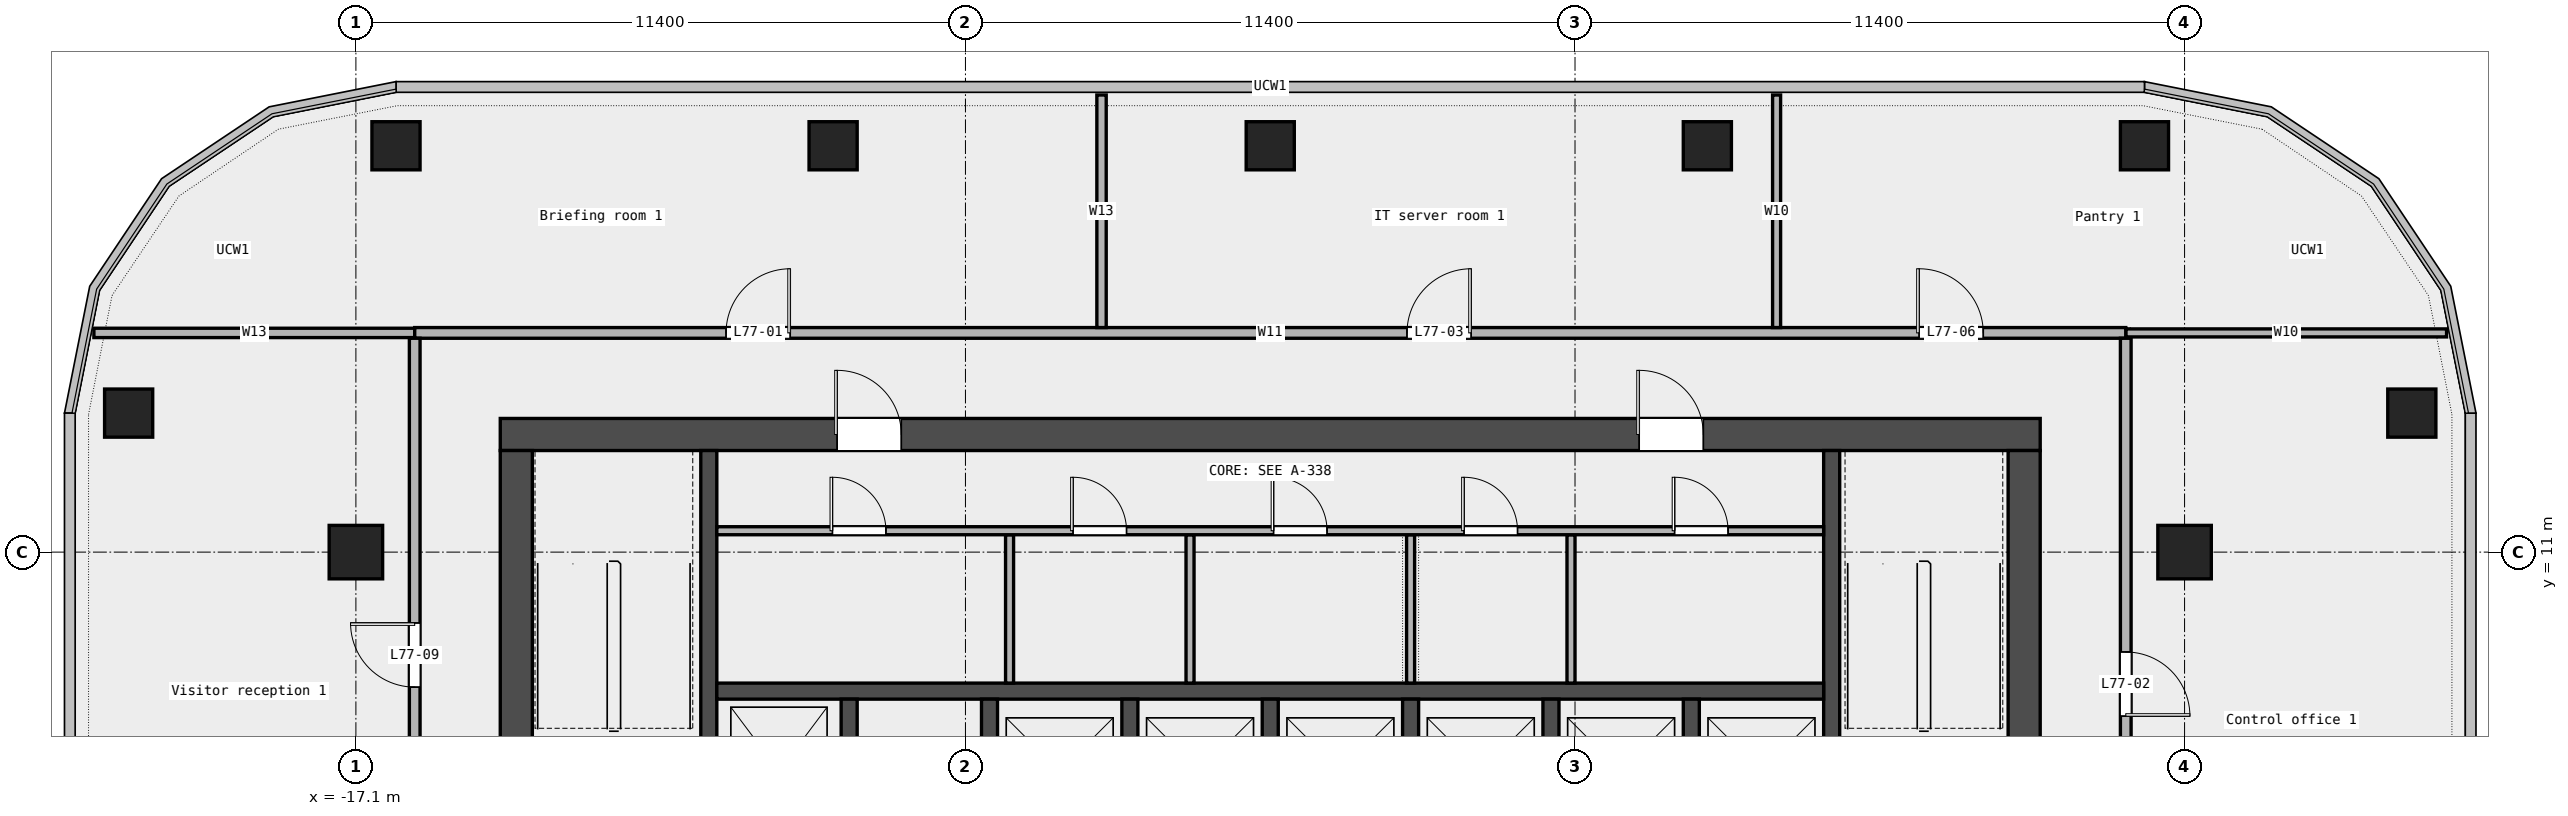
"""IFC4 building model, lengths in metres.
Left out: names, types, materials, properties, quantities, classifications, styles, units other than length and angle.
Written with IfcOpenShell. Run it as: python <this file> out.ifc"""

import sys

from ifc_helpers import new_model, si_unit, direction, frame, frame_2d, origin, origin_2d, place, context, subcontext, project, spatial, rectangle, extrude, element, fill, save


model = new_model("IFC4")
c1 = context("Model", 3, precision=1e-05, world=origin(), true_north=direction((0.0, 1.0)))
c2 = subcontext(c1, "Body", "Model", "MODEL_VIEW")
j1 = project(units=[si_unit("LENGTHUNIT", "METRE"), si_unit("PLANEANGLEUNIT", "RADIAN")], contexts=[c1])
p1 = place(None, origin())
s1 = spatial("IfcSite", under=j1, at=p1, CompositionType="ELEMENT")
p2 = place(p1, origin())
s2 = spatial("IfcBuilding", under=s1, at=p2, CompositionType="ELEMENT")
p3 = place(p2, frame((0.0, 0.0, 353.4)))
s3 = spatial("IfcBuildingStorey", under=s2, at=p3, CompositionType="ELEMENT", Elevation=353.4)
for number, where, z_axis, x_axis in (
    (1, (21.35, 13.6, 0.0), (0.0, 0.0, 1.0), (1.0, 0.0, 0.0)),
    (2, (16.35, 18.6, 0.0), (0.0, 0.0, 1.0), (1.0, 0.0, 0.0)),
    (3, (8.175, 18.6, 0.0), (0.0, 0.0, 1.0), (1.0, 0.0, 0.0)),
    (4, (0.0, 18.6, 0.0), (0.0, 0.0, 1.0), (1.0, 0.0, 0.0)),
    (5, (-8.175, 18.6, 0.0), (0.0, 0.0, 1.0), (1.0, 0.0, 0.0)),
    (6, (-16.35, 18.6, 0.0), (0.0, 0.0, 1.0), (1.0, 0.0, 0.0)),
    (7, (-21.35, 13.6, 0.0), (0.0, 0.0, 1.0), (1.0, 0.0, 0.0)),
):
    element("IfcColumn", number, at=place(p3, frame(where, z_axis=z_axis, x_axis=x_axis)), inside=s3, PredefinedType="COLUMN", context=c2, shape_type="SweptSolid", body=[
        extrude(rectangle(XDim=0.9, YDim=0.9, at=origin_2d()), origin(), (0.0, 0.0, 1.0), 3.6),
    ])
for number, where, z_axis, x_axis in (
    (8, (-17.1, 11.0, 0.0), (0.0, 0.0, 1.0), (1.0, 0.0, 0.0)),
    (9, (17.1, 11.0, 0.0), (0.0, 0.0, 1.0), (1.0, 0.0, 0.0)),
):
    element("IfcColumn", number, at=place(p3, frame(where, z_axis=z_axis, x_axis=x_axis)), inside=s3, PredefinedType="COLUMN", context=c2, shape_type="SweptSolid", body=[
        extrude(rectangle(XDim=1.0, YDim=1.0, at=origin_2d()), origin(), (0.0, 0.0, 1.0), 3.6),
    ])
p4 = place(p3, frame((16.0, 15.1, 0.0), z_axis=(0.0, 0.0, 1.0), x_axis=(1.0, 0.0, 0.0)))
e10 = element("IfcWall", 10, at=p4, inside=s3, PredefinedType="PARTITIONING", context=c2, shape_type="SweptSolid", body=[
    extrude(rectangle(XDim=6.0, YDim=0.15, at=frame_2d((3.0, 0.0))), origin(), (0.0, 0.0, 1.0), 3.6),
])
p5 = place(p3, frame((-22.0, 15.1, 0.0), z_axis=(0.0, 0.0, 1.0), x_axis=(1.0, 0.0, 0.0)))
e11 = element("IfcWall", 11, at=p5, inside=s3, PredefinedType="PARTITIONING", context=c2, shape_type="SweptSolid", body=[
    extrude(rectangle(XDim=6.0, YDim=0.175, at=frame_2d((3.0, 0.0))), origin(), (0.0, 0.0, 1.0), 3.6),
])
p6 = place(p3, frame((-16.0, 15.1, 0.0), z_axis=(0.0, 0.0, 1.0), x_axis=(1.0, 0.0, 0.0)))
e12 = element("IfcWall", 12, at=p6, inside=s3, PredefinedType="PARTITIONING", context=c2, shape_type="SweptSolid", body=[
    extrude(rectangle(XDim=32.0, YDim=0.2, at=frame_2d((16.0, 0.0))), origin(), (0.0, 0.0, 1.0), 3.6),
])
p7 = place(p6, frame((5.823, 0.0, 0.0)))
e13 = element("IfcOpeningElement", 13, at=p7, cuts=e12, PredefinedType="OPENING", context=c2, shape_type="SweptSolid", body=[
    extrude(rectangle(XDim=1.2, YDim=2.1, at=frame_2d((0.6, 1.05))), frame((0.0, 0.112, 0.0), z_axis=(0.0, -1.0, 0.0), x_axis=(1.0, 0.0, 0.0)), (0.0, 0.0, 1.0), 0.224),
])
p8 = place(p6, frame((18.558, 0.0, 0.0)))
e14 = element("IfcOpeningElement", 14, at=p8, cuts=e12, PredefinedType="OPENING", context=c2, shape_type="SweptSolid", body=[
    extrude(rectangle(XDim=1.2, YDim=2.1, at=frame_2d((0.6, 1.05))), frame((0.0, 0.112, 0.0), z_axis=(0.0, -1.0, 0.0), x_axis=(1.0, 0.0, 0.0)), (0.0, 0.0, 1.0), 0.224),
])
p9 = place(p6, frame((28.135, 0.0, 0.0)))
e15 = element("IfcOpeningElement", 15, at=p9, cuts=e12, PredefinedType="OPENING", context=c2, shape_type="SweptSolid", body=[
    extrude(rectangle(XDim=1.2, YDim=2.1, at=frame_2d((0.6, 1.05))), frame((0.0, 0.112, 0.0), z_axis=(0.0, -1.0, 0.0), x_axis=(1.0, 0.0, 0.0)), (0.0, 0.0, 1.0), 0.224),
])
p10 = place(p3, frame((-16.0, -8.7, 0.0), z_axis=(0.0, 0.0, 1.0), x_axis=(0.0, 1.0, 0.0)))
e16 = element("IfcWall", 16, at=p10, inside=s3, PredefinedType="PARTITIONING", context=c2, shape_type="SweptSolid", body=[
    extrude(rectangle(XDim=23.7, YDim=0.2, at=frame_2d((11.85, 0.0))), origin(), (0.0, 0.0, 1.0), 3.6),
])
p11 = place(p10, frame((5.325, 0.0, 0.0)))
e17 = element("IfcOpeningElement", 17, at=p11, cuts=e16, PredefinedType="OPENING", context=c2, shape_type="SweptSolid", body=[
    extrude(rectangle(XDim=1.2, YDim=2.1, at=frame_2d((0.6, 1.05))), frame((0.0, 0.112, 0.0), z_axis=(0.0, -1.0, 0.0), x_axis=(1.0, 0.0, 0.0)), (0.0, 0.0, 1.0), 0.224),
])
p12 = place(p10, frame((17.175, 0.0, 0.0)))
e18 = element("IfcOpeningElement", 18, at=p12, cuts=e16, PredefinedType="OPENING", context=c2, shape_type="SweptSolid", body=[
    extrude(rectangle(XDim=1.2, YDim=2.1, at=frame_2d((0.6, 1.05))), frame((0.0, 0.112, 0.0), z_axis=(0.0, -1.0, 0.0), x_axis=(1.0, 0.0, 0.0)), (0.0, 0.0, 1.0), 0.224),
])
p13 = place(p3, frame((-3.155, 15.2, 0.0), z_axis=(0.0, 0.0, 1.0), x_axis=(0.0, 1.0, 0.0)))
e19 = element("IfcWall", 19, at=p13, inside=s3, PredefinedType="PARTITIONING", context=c2, shape_type="SweptSolid", body=[
    extrude(rectangle(XDim=4.35, YDim=0.175, at=frame_2d((2.175, 0.0))), origin(), (0.0, 0.0, 1.0), 3.6),
])
p14 = place(p3, frame((9.47, 15.2, 0.0), z_axis=(0.0, 0.0, 1.0), x_axis=(0.0, 1.0, 0.0)))
e20 = element("IfcWall", 20, at=p14, inside=s3, PredefinedType="PARTITIONING", context=c2, shape_type="SweptSolid", body=[
    extrude(rectangle(XDim=4.35, YDim=0.15, at=frame_2d((2.175, 0.0))), origin(), (0.0, 0.0, 1.0), 3.6),
])
p15 = place(p3, frame((16.0, -8.7, 0.0), z_axis=(0.0, 0.0, 1.0), x_axis=(0.0, 1.0, 0.0)))
e21 = element("IfcWall", 21, at=p15, inside=s3, PredefinedType="PARTITIONING", context=c2, shape_type="SweptSolid", body=[
    extrude(rectangle(XDim=23.7, YDim=0.2, at=frame_2d((11.85, 0.0))), origin(), (0.0, 0.0, 1.0), 3.6),
])
p16 = place(p15, frame((16.633, 0.0, 0.0)))
e22 = element("IfcOpeningElement", 22, at=p16, cuts=e21, PredefinedType="OPENING", context=c2, shape_type="SweptSolid", body=[
    extrude(rectangle(XDim=1.2, YDim=2.1, at=frame_2d((0.6, 1.05))), frame((0.0, 0.112, 0.0), z_axis=(0.0, -1.0, 0.0), x_axis=(1.0, 0.0, 0.0)), (0.0, 0.0, 1.0), 0.224),
])
p17 = place(p15, frame((4.883, 0.0, 0.0)))
e23 = element("IfcOpeningElement", 23, at=p17, cuts=e21, PredefinedType="OPENING", context=c2, shape_type="SweptSolid", body=[
    extrude(rectangle(XDim=1.0, YDim=2.1, at=frame_2d((0.5, 1.05))), frame((0.0, 0.112, 0.0), z_axis=(0.0, -1.0, 0.0), x_axis=(1.0, 0.0, 0.0)), (0.0, 0.0, 1.0), 0.224),
])
p18 = place(p3, frame((-14.4, 13.2, 0.0), z_axis=(0.0, 0.0, 1.0), x_axis=(1.0, 0.0, 0.0)))
e24 = element("IfcWall", 24, at=p18, inside=s3, PredefinedType="SHEAR", context=c2, shape_type="SweptSolid", body=[
    extrude(rectangle(XDim=28.8, YDim=0.6, at=frame_2d((14.4, 0.0))), origin(), (0.0, 0.0, 1.0), 3.7),
])
p19 = place(p18, frame((6.3, 0.0, 0.0)))
e25 = element("IfcOpeningElement", 25, at=p19, cuts=e24, PredefinedType="OPENING", context=c2, shape_type="SweptSolid", body=[
    extrude(rectangle(XDim=1.2, YDim=2.1, at=frame_2d((0.6, 1.05))), frame((0.0, 0.312, 0.0), z_axis=(0.0, -1.0, 0.0), x_axis=(1.0, 0.0, 0.0)), (0.0, 0.0, 1.0), 0.624),
])
p20 = place(p18, frame((21.3, 0.0, 0.0)))
e26 = element("IfcOpeningElement", 26, at=p20, cuts=e24, PredefinedType="OPENING", context=c2, shape_type="SweptSolid", body=[
    extrude(rectangle(XDim=1.2, YDim=2.1, at=frame_2d((0.6, 1.05))), frame((0.0, 0.312, 0.0), z_axis=(0.0, -1.0, 0.0), x_axis=(1.0, 0.0, 0.0)), (0.0, 0.0, 1.0), 0.624),
])
p21 = place(p3, frame((-14.1, -6.6, 0.0), z_axis=(0.0, 0.0, 1.0), x_axis=(0.0, 1.0, 0.0)))
e27 = element("IfcWall", 27, at=p21, inside=s3, PredefinedType="SHEAR", context=c2, shape_type="SweptSolid", body=[
    extrude(rectangle(XDim=19.5, YDim=0.6, at=frame_2d((9.75, 0.0))), origin(), (0.0, 0.0, 1.0), 3.7),
])
p22 = place(p21, frame((9.3, 0.0, 0.0)))
e28 = element("IfcOpeningElement", 28, at=p22, cuts=e27, PredefinedType="OPENING", context=c2, shape_type="SweptSolid", body=[
    extrude(rectangle(XDim=1.8, YDim=2.1, at=frame_2d((0.9, 1.05))), frame((0.0, 0.312, 0.0), z_axis=(0.0, -1.0, 0.0), x_axis=(1.0, 0.0, 0.0)), (0.0, 0.0, 1.0), 0.624),
])
p23 = place(p3, frame((14.1, -6.6, 0.0), z_axis=(0.0, 0.0, 1.0), x_axis=(0.0, 1.0, 0.0)))
e29 = element("IfcWall", 29, at=p23, inside=s3, PredefinedType="SHEAR", context=c2, shape_type="SweptSolid", body=[
    extrude(rectangle(XDim=19.5, YDim=0.6, at=frame_2d((9.75, 0.0))), origin(), (0.0, 0.0, 1.0), 3.7),
])
p24 = place(p23, frame((9.3, 0.0, 0.0)))
e30 = element("IfcOpeningElement", 30, at=p24, cuts=e29, PredefinedType="OPENING", context=c2, shape_type="SweptSolid", body=[
    extrude(rectangle(XDim=1.8, YDim=2.1, at=frame_2d((0.9, 1.05))), frame((0.0, 0.312, 0.0), z_axis=(0.0, -1.0, 0.0), x_axis=(1.0, 0.0, 0.0)), (0.0, 0.0, 1.0), 0.624),
])
for number, where, z_axis, x_axis in (
    (31, (-10.5, 5.25, 0.0), (0.0, 0.0, 1.0), (0.0, 1.0, 0.0)),
    (32, (10.5, 5.25, 0.0), (0.0, 0.0, 1.0), (0.0, 1.0, 0.0)),
):
    element("IfcWall", number, at=place(p3, frame(where, z_axis=z_axis, x_axis=x_axis)), inside=s3, PredefinedType="SHEAR", context=c2, shape_type="SweptSolid", body=[
        extrude(rectangle(XDim=7.65, YDim=0.3, at=frame_2d((3.825, 0.0))), origin(), (0.0, 0.0, 1.0), 3.7),
    ])
p25 = place(p3, frame((-10.35, 8.4, 0.0), z_axis=(0.0, 0.0, 1.0), x_axis=(1.0, 0.0, 0.0)))
e33 = element("IfcWall", 33, at=p25, inside=s3, PredefinedType="SOLIDWALL", context=c2, shape_type="SweptSolid", body=[
    extrude(rectangle(XDim=20.7, YDim=0.3, at=frame_2d((10.35, 0.0))), origin(), (0.0, 0.0, 1.0), 3.7),
])
for number, where, z_axis, x_axis in (
    (34, (-7.875, 5.55, 0.0), (0.0, 0.0, 1.0), (0.0, 1.0, 0.0)),
    (35, (-5.25, 5.55, 0.0), (0.0, 0.0, 1.0), (0.0, 1.0, 0.0)),
    (36, (-2.625, 5.55, 0.0), (0.0, 0.0, 1.0), (0.0, 1.0, 0.0)),
    (37, (0.0, 5.55, 0.0), (0.0, 0.0, 1.0), (0.0, 1.0, 0.0)),
    (38, (2.625, 5.55, 0.0), (0.0, 0.0, 1.0), (0.0, 1.0, 0.0)),
    (39, (5.25, 5.55, 0.0), (0.0, 0.0, 1.0), (0.0, 1.0, 0.0)),
    (40, (7.875, 5.55, 0.0), (0.0, 0.0, 1.0), (0.0, 1.0, 0.0)),
):
    element("IfcWall", number, at=place(p3, frame(where, z_axis=z_axis, x_axis=x_axis)), inside=s3, PredefinedType="SOLIDWALL", context=c2, shape_type="SweptSolid", body=[
        extrude(rectangle(XDim=2.7, YDim=0.3, at=frame_2d((1.35, 0.0))), origin(), (0.0, 0.0, 1.0), 3.7),
    ])
for number, where, z_axis, x_axis in (
    (41, (-4.875, 8.55, 0.0), (0.0, 0.0, 1.0), (0.0, 1.0, 0.0)),
    (42, (-1.5, 8.55, 0.0), (0.0, 0.0, 1.0), (0.0, 1.0, 0.0)),
    (43, (2.625, 8.55, 0.0), (0.0, 0.0, 1.0), (0.0, 1.0, 0.0)),
    (44, (5.625, 8.55, 0.0), (0.0, 0.0, 1.0), (0.0, 1.0, 0.0)),
):
    element("IfcWall", number, at=place(p3, frame(where, z_axis=z_axis, x_axis=x_axis)), inside=s3, PredefinedType="PARTITIONING", context=c2, shape_type="SweptSolid", body=[
        extrude(rectangle(XDim=2.775, YDim=0.15, at=frame_2d((1.387, 0.0))), origin(), (0.0, 0.0, 1.0), 3.7),
    ])
p26 = place(p3, frame((-10.35, 11.4, 0.0), z_axis=(0.0, 0.0, 1.0), x_axis=(1.0, 0.0, 0.0)))
e45 = element("IfcWall", 45, at=p26, inside=s3, PredefinedType="PARTITIONING", context=c2, shape_type="SweptSolid", body=[
    extrude(rectangle(XDim=20.7, YDim=0.15, at=frame_2d((10.35, 0.0))), origin(), (0.0, 0.0, 1.0), 3.7),
])
p27 = place(p26, frame((2.163, 0.0, 0.0)))
e46 = element("IfcOpeningElement", 46, at=p27, cuts=e45, PredefinedType="OPENING", context=c2, shape_type="SweptSolid", body=[
    extrude(rectangle(XDim=1.0, YDim=2.1, at=frame_2d((0.5, 1.05))), frame((0.0, 0.087, 0.0), z_axis=(0.0, -1.0, 0.0), x_axis=(1.0, 0.0, 0.0)), (0.0, 0.0, 1.0), 0.174),
])
p28 = place(p26, frame((6.663, 0.0, 0.0)))
e47 = element("IfcOpeningElement", 47, at=p28, cuts=e45, PredefinedType="OPENING", context=c2, shape_type="SweptSolid", body=[
    extrude(rectangle(XDim=1.0, YDim=2.1, at=frame_2d((0.5, 1.05))), frame((0.0, 0.087, 0.0), z_axis=(0.0, -1.0, 0.0), x_axis=(1.0, 0.0, 0.0)), (0.0, 0.0, 1.0), 0.174),
])
p29 = place(p26, frame((10.413, 0.0, 0.0)))
e48 = element("IfcOpeningElement", 48, at=p29, cuts=e45, PredefinedType="OPENING", context=c2, shape_type="SweptSolid", body=[
    extrude(rectangle(XDim=1.0, YDim=2.1, at=frame_2d((0.5, 1.05))), frame((0.0, 0.087, 0.0), z_axis=(0.0, -1.0, 0.0), x_axis=(1.0, 0.0, 0.0)), (0.0, 0.0, 1.0), 0.174),
])
p30 = place(p26, frame((13.975, 0.0, 0.0)))
e49 = element("IfcOpeningElement", 49, at=p30, cuts=e45, PredefinedType="OPENING", context=c2, shape_type="SweptSolid", body=[
    extrude(rectangle(XDim=1.0, YDim=2.1, at=frame_2d((0.5, 1.05))), frame((0.0, 0.087, 0.0), z_axis=(0.0, -1.0, 0.0), x_axis=(1.0, 0.0, 0.0)), (0.0, 0.0, 1.0), 0.174),
])
p31 = place(p26, frame((17.913, 0.0, 0.0)))
e50 = element("IfcOpeningElement", 50, at=p31, cuts=e45, PredefinedType="OPENING", context=c2, shape_type="SweptSolid", body=[
    extrude(rectangle(XDim=1.0, YDim=2.1, at=frame_2d((0.5, 1.05))), frame((0.0, 0.087, 0.0), z_axis=(0.0, -1.0, 0.0), x_axis=(1.0, 0.0, 0.0)), (0.0, 0.0, 1.0), 0.174),
])
p32 = place(p7, origin())
e51 = element("IfcDoor", 51, at=p32, inside=s3, OperationType="SINGLE_SWING_RIGHT", PredefinedType="DOOR", context=c2, shape_type="SweptSolid", body=[
    extrude(rectangle(XDim=1.2, YDim=2.1, at=frame_2d((0.6, 1.05))), frame((0.0, 0.025, 0.0), z_axis=(0.0, -1.0, 0.0), x_axis=(1.0, 0.0, 0.0)), (0.0, 0.0, 1.0), 0.05),
])
fill(e13, e51)
p33 = place(p16, origin())
e52 = element("IfcDoor", 52, at=p33, inside=s3, OperationType="SINGLE_SWING_RIGHT", PredefinedType="DOOR", context=c2, shape_type="SweptSolid", body=[
    extrude(rectangle(XDim=1.2, YDim=2.1, at=frame_2d((0.6, 1.05))), frame((0.0, 0.025, 0.0), z_axis=(0.0, -1.0, 0.0), x_axis=(1.0, 0.0, 0.0)), (0.0, 0.0, 1.0), 0.05),
])
fill(e22, e52)
p34 = place(p8, origin())
e53 = element("IfcDoor", 53, at=p34, inside=s3, OperationType="SINGLE_SWING_RIGHT", PredefinedType="DOOR", context=c2, shape_type="SweptSolid", body=[
    extrude(rectangle(XDim=1.2, YDim=2.1, at=frame_2d((0.6, 1.05))), frame((0.0, 0.025, 0.0), z_axis=(0.0, -1.0, 0.0), x_axis=(1.0, 0.0, 0.0)), (0.0, 0.0, 1.0), 0.05),
])
fill(e14, e53)
p35 = place(p9, origin())
e54 = element("IfcDoor", 54, at=p35, inside=s3, OperationType="SINGLE_SWING_LEFT", PredefinedType="DOOR", context=c2, shape_type="SweptSolid", body=[
    extrude(rectangle(XDim=1.2, YDim=2.1, at=frame_2d((0.6, 1.05))), frame((0.0, 0.025, 0.0), z_axis=(0.0, -1.0, 0.0), x_axis=(1.0, 0.0, 0.0)), (0.0, 0.0, 1.0), 0.05),
])
fill(e15, e54)
p36 = place(p12, origin())
e55 = element("IfcDoor", 55, at=p36, inside=s3, OperationType="SINGLE_SWING_RIGHT", PredefinedType="DOOR", context=c2, shape_type="SweptSolid", body=[
    extrude(rectangle(XDim=1.2, YDim=2.1, at=frame_2d((0.6, 1.05))), frame((0.0, 0.025, 0.0), z_axis=(0.0, -1.0, 0.0), x_axis=(1.0, 0.0, 0.0)), (0.0, 0.0, 1.0), 0.05),
])
fill(e18, e55)
p37 = place(p27, origin())
e56 = element("IfcDoor", 56, at=p37, inside=s3, OperationType="SINGLE_SWING_LEFT", PredefinedType="DOOR", context=c2, shape_type="SweptSolid", body=[
    extrude(rectangle(XDim=1.0, YDim=2.1, at=frame_2d((0.5, 1.05))), frame((0.0, 0.025, 0.0), z_axis=(0.0, -1.0, 0.0), x_axis=(1.0, 0.0, 0.0)), (0.0, 0.0, 1.0), 0.05),
])
fill(e46, e56)
p38 = place(p28, origin())
e57 = element("IfcDoor", 57, at=p38, inside=s3, OperationType="SINGLE_SWING_LEFT", PredefinedType="DOOR", context=c2, shape_type="SweptSolid", body=[
    extrude(rectangle(XDim=1.0, YDim=2.1, at=frame_2d((0.5, 1.05))), frame((0.0, 0.025, 0.0), z_axis=(0.0, -1.0, 0.0), x_axis=(1.0, 0.0, 0.0)), (0.0, 0.0, 1.0), 0.05),
])
fill(e47, e57)
p39 = place(p29, origin())
e58 = element("IfcDoor", 58, at=p39, inside=s3, OperationType="SINGLE_SWING_LEFT", PredefinedType="DOOR", context=c2, shape_type="SweptSolid", body=[
    extrude(rectangle(XDim=1.0, YDim=2.1, at=frame_2d((0.5, 1.05))), frame((0.0, 0.025, 0.0), z_axis=(0.0, -1.0, 0.0), x_axis=(1.0, 0.0, 0.0)), (0.0, 0.0, 1.0), 0.05),
])
fill(e48, e58)
p40 = place(p30, origin())
e59 = element("IfcDoor", 59, at=p40, inside=s3, OperationType="SINGLE_SWING_LEFT", PredefinedType="DOOR", context=c2, shape_type="SweptSolid", body=[
    extrude(rectangle(XDim=1.0, YDim=2.1, at=frame_2d((0.5, 1.05))), frame((0.0, 0.025, 0.0), z_axis=(0.0, -1.0, 0.0), x_axis=(1.0, 0.0, 0.0)), (0.0, 0.0, 1.0), 0.05),
])
fill(e49, e59)
p41 = place(p31, origin())
e60 = element("IfcDoor", 60, at=p41, inside=s3, OperationType="SINGLE_SWING_LEFT", PredefinedType="DOOR", context=c2, shape_type="SweptSolid", body=[
    extrude(rectangle(XDim=1.0, YDim=2.1, at=frame_2d((0.5, 1.05))), frame((0.0, 0.025, 0.0), z_axis=(0.0, -1.0, 0.0), x_axis=(1.0, 0.0, 0.0)), (0.0, 0.0, 1.0), 0.05),
])
fill(e50, e60)
p42 = place(p19, origin())
e61 = element("IfcDoor", 61, at=p42, inside=s3, OperationType="SINGLE_SWING_LEFT", PredefinedType="DOOR", context=c2, shape_type="SweptSolid", body=[
    extrude(rectangle(XDim=1.2, YDim=2.1, at=frame_2d((0.6, 1.05))), frame((0.0, 0.025, 0.0), z_axis=(0.0, -1.0, 0.0), x_axis=(1.0, 0.0, 0.0)), (0.0, 0.0, 1.0), 0.05),
])
fill(e25, e61)
p43 = place(p20, origin())
e62 = element("IfcDoor", 62, at=p43, inside=s3, OperationType="SINGLE_SWING_RIGHT", PredefinedType="DOOR", context=c2, shape_type="SweptSolid", body=[
    extrude(rectangle(XDim=1.2, YDim=2.1, at=frame_2d((0.6, 1.05))), frame((0.0, 0.025, 0.0), z_axis=(0.0, -1.0, 0.0), x_axis=(1.0, 0.0, 0.0)), (0.0, 0.0, 1.0), 0.05),
])
fill(e26, e62)
save(model, sys.argv[1])
